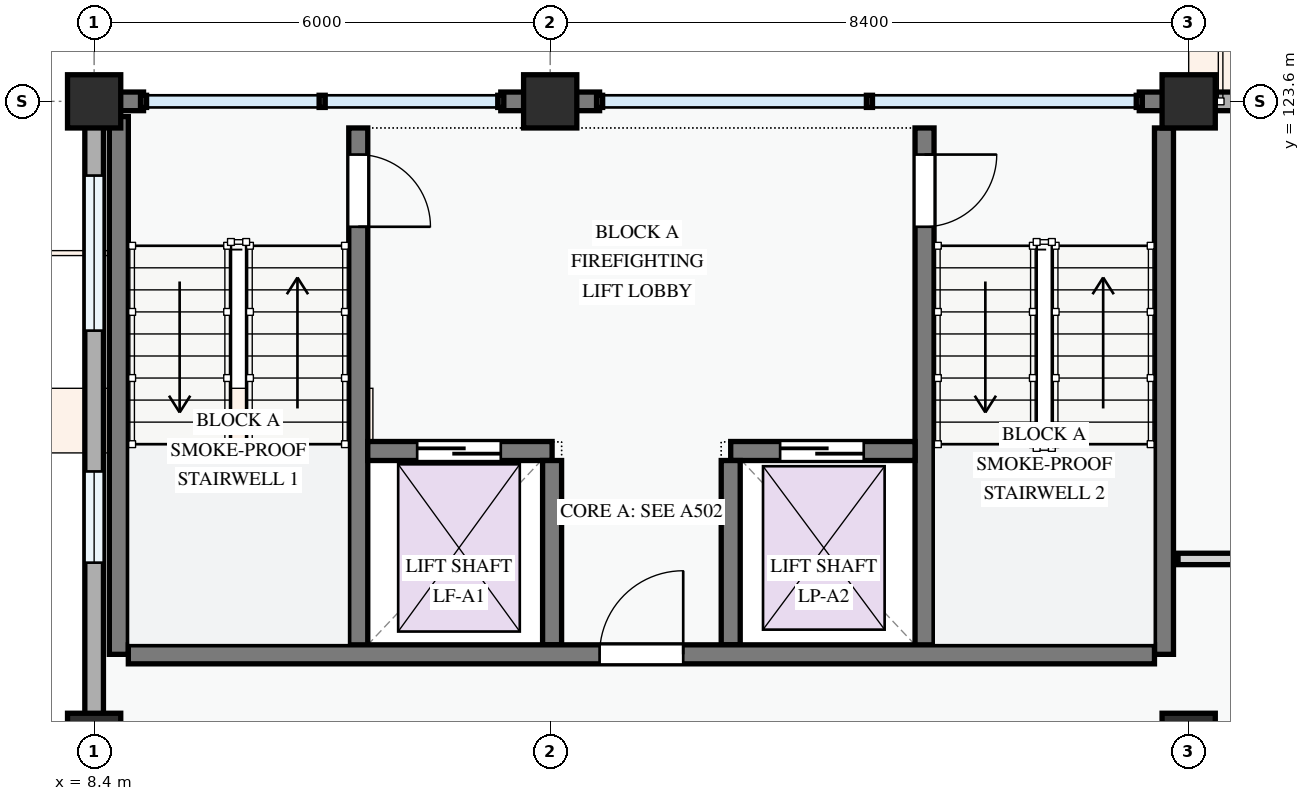
"""IFC4 building model, lengths in metres.
Left out: names, types, materials, properties, quantities, classifications, styles, units other than length and angle.
Written with IfcOpenShell. Run it as: python <this file> out.ifc"""

import sys

from ifc_helpers import new_model, si_unit, direction, frame, frame_2d, origin, origin_2d, place, context, subcontext, project, spatial, rectangle, extrude, element, fill, save


model = new_model("IFC4")
c1 = context("Model", 3, precision=1e-05, world=origin(), true_north=direction((0.0, 1.0)))
c2 = subcontext(c1, "Body", "Model", "MODEL_VIEW")
j1 = project(units=[si_unit("LENGTHUNIT", "METRE"), si_unit("PLANEANGLEUNIT", "RADIAN")], contexts=[c1])
p1 = place(None, origin())
s1 = spatial("IfcSite", under=j1, at=p1, CompositionType="ELEMENT")
p2 = place(p1, origin())
s2 = spatial("IfcBuilding", under=s1, at=p2, CompositionType="ELEMENT")
p3 = place(p2, frame((0.0, 0.0, 8.1)))
s3 = spatial("IfcBuildingStorey", under=s2, at=p3, CompositionType="ELEMENT", Elevation=8.1)
for number, where, z_axis, x_axis in (
    (1, (8.4, 115.2, 0.0), (0.0, 0.0, 1.0), (1.0, 0.0, 0.0)),
    (2, (8.4, 123.6, 0.0), (0.0, 0.0, 1.0), (1.0, 0.0, 0.0)),
    (3, (14.4, 123.6, 0.0), (0.0, 0.0, 1.0), (1.0, 0.0, 0.0)),
    (4, (22.8, 115.2, 0.0), (0.0, 0.0, 1.0), (1.0, 0.0, 0.0)),
    (5, (22.8, 123.6, 0.0), (0.0, 0.0, 1.0), (1.0, 0.0, 0.0)),
):
    element("IfcColumn", number, at=place(p3, frame(where, z_axis=z_axis, x_axis=x_axis)), inside=s3, PredefinedType="COLUMN", context=c2, shape_type="SweptSolid", body=[
        extrude(rectangle(XDim=0.7, YDim=0.7, at=origin_2d()), origin(), (0.0, 0.0, 1.0), 3.3),
    ])
p4 = place(p3, frame((28.8, 123.6, 0.0), z_axis=(0.0, 0.0, 1.0), x_axis=(-1.0, 0.0, 0.0)))
e6 = element("IfcWall", 6, at=p4, inside=s3, PredefinedType="STANDARD", context=c2, shape_type="SweptSolid", body=[
    extrude(rectangle(XDim=6.0, YDim=0.245, at=frame_2d((3.0, 0.0))), origin(), (0.0, 0.0, 1.0), 2.445),
])
p5 = place(p4, frame((0.62, 0.0, 0.0)))
e7 = element("IfcOpeningElement", 7, at=p5, cuts=e6, PredefinedType="OPENING", context=c2, shape_type="SweptSolid", body=[
    extrude(rectangle(XDim=1.6, YDim=2.2, at=frame_2d((0.8, 1.1))), frame((0.0, 0.133, 0.0), z_axis=(0.0, -1.0, 0.0), x_axis=(1.0, 0.0, 0.0)), (0.0, 0.0, 1.0), 0.265),
])
p6 = place(p4, frame((3.35, 0.0, 0.78)))
e8 = element("IfcOpeningElement", 8, at=p6, cuts=e6, PredefinedType="OPENING", context=c2, shape_type="SweptSolid", body=[
    extrude(rectangle(XDim=1.38, YDim=1.48, at=frame_2d((0.69, 0.74))), frame((0.0, 0.133, 0.0), z_axis=(0.0, -1.0, 0.0), x_axis=(1.0, 0.0, 0.0)), (0.0, 0.0, 1.0), 0.265),
])
for number, where, z_axis, x_axis in (
    (9, (22.8, 123.6, 0.0), (0.0, 0.0, 1.0), (-1.0, 0.0, 0.0)),
    (10, (15.05, 123.6, 0.0), (0.0, 0.0, 1.0), (-1.0, 0.0, 0.0)),
):
    element("IfcWall", number, at=place(p3, frame(where, z_axis=z_axis, x_axis=x_axis)), inside=s3, PredefinedType="STANDARD", context=c2, shape_type="SweptSolid", body=[
        extrude(rectangle(XDim=0.65, YDim=0.245, at=frame_2d((0.325, 0.0))), origin(), (0.0, 0.0, 1.0), 3.04),
    ])
p7 = place(p3, frame((14.4, 123.6, 0.0), z_axis=(0.0, 0.0, 1.0), x_axis=(-1.0, 0.0, 0.0)))
e11 = element("IfcWall", 11, at=p7, inside=s3, PredefinedType="STANDARD", context=c2, shape_type="SweptSolid", body=[
    extrude(rectangle(XDim=0.65, YDim=0.245, at=frame_2d((0.325, 0.0))), origin(), (0.0, 0.0, 1.0), 3.04),
])
p8 = place(p3, frame((9.05, 123.6, 0.0), z_axis=(0.0, 0.0, 1.0), x_axis=(-1.0, 0.0, 0.0)))
e12 = element("IfcWall", 12, at=p8, inside=s3, PredefinedType="STANDARD", context=c2, shape_type="SweptSolid", body=[
    extrude(rectangle(XDim=0.526, YDim=0.245, at=frame_2d((0.263, 0.0))), origin(), (0.0, 0.0, 1.0), 3.04),
])
p9 = place(p3, frame((8.4, 123.6, 0.0), z_axis=(0.0, 0.0, 1.0), x_axis=(0.0, -1.0, 0.0)))
e13 = element("IfcWall", 13, at=p9, inside=s3, PredefinedType="STANDARD", context=c2, shape_type="SweptSolid", body=[
    extrude(rectangle(XDim=8.4, YDim=0.245, at=frame_2d((4.2, 0.0))), origin(), (0.0, 0.0, 1.0), 2.345),
])
p10 = place(p9, frame((0.976, 0.0, 0.78)))
e14 = element("IfcOpeningElement", 14, at=p10, cuts=e13, PredefinedType="OPENING", context=c2, shape_type="SweptSolid", body=[
    extrude(rectangle(XDim=2.04, YDim=1.46, at=frame_2d((1.02, 0.73))), frame((0.0, 0.133, 0.0), z_axis=(0.0, -1.0, 0.0), x_axis=(1.0, 0.0, 0.0)), (0.0, 0.0, 1.0), 0.265),
])
p11 = place(p9, frame((4.869, 0.0, 0.78)))
e15 = element("IfcOpeningElement", 15, at=p11, cuts=e13, PredefinedType="OPENING", context=c2, shape_type="SweptSolid", body=[
    extrude(rectangle(XDim=1.2, YDim=1.35, at=frame_2d((0.6, 0.675))), frame((0.0, 0.133, 0.0), z_axis=(0.0, -1.0, 0.0), x_axis=(1.0, 0.0, 0.0)), (0.0, 0.0, 1.0), 0.265),
])
p12 = place(p3, frame((11.875, 123.25, 0.0), z_axis=(0.0, 0.0, 1.0), x_axis=(0.0, -1.0, 0.0)))
e16 = element("IfcWall", 16, at=p12, inside=s3, PredefinedType="SHEAR", context=c2, shape_type="SweptSolid", body=[
    extrude(rectangle(XDim=6.925, YDim=0.25, at=frame_2d((3.462, 0.0))), origin(), (0.0, 0.0, 1.0), 3.0),
])
p13 = place(p12, frame((0.35, 0.0, 0.0)))
e17 = element("IfcOpeningElement", 17, at=p13, cuts=e16, PredefinedType="OPENING", context=c2, shape_type="SweptSolid", body=[
    extrude(rectangle(XDim=0.95, YDim=2.1, at=frame_2d((0.475, 1.05))), frame((0.0, 0.135, 0.0), z_axis=(0.0, -1.0, 0.0), x_axis=(1.0, 0.0, 0.0)), (0.0, 0.0, 1.0), 0.27),
])
p14 = place(p3, frame((8.725, 123.4, 0.0), z_axis=(0.0, 0.0, 1.0), x_axis=(0.0, -1.0, 0.0)))
e18 = element("IfcWall", 18, at=p14, inside=s3, PredefinedType="SHEAR", context=c2, shape_type="SweptSolid", body=[
    extrude(rectangle(XDim=7.075, YDim=0.25, at=frame_2d((3.538, 0.0))), origin(), (0.0, 0.0, 1.0), 3.0),
])
p15 = place(p3, frame((22.475, 123.25, 0.0), z_axis=(0.0, 0.0, 1.0), x_axis=(0.0, -1.0, 0.0)))
e19 = element("IfcWall", 19, at=p15, inside=s3, PredefinedType="SHEAR", context=c2, shape_type="SweptSolid", body=[
    extrude(rectangle(XDim=6.925, YDim=0.25, at=frame_2d((3.462, 0.0))), origin(), (0.0, 0.0, 1.0), 3.0),
])
p16 = place(p3, frame((19.325, 123.25, 0.0), z_axis=(0.0, 0.0, 1.0), x_axis=(0.0, -1.0, 0.0)))
e20 = element("IfcWall", 20, at=p16, inside=s3, PredefinedType="SHEAR", context=c2, shape_type="SweptSolid", body=[
    extrude(rectangle(XDim=6.925, YDim=0.25, at=frame_2d((3.462, 0.0))), origin(), (0.0, 0.0, 1.0), 3.0),
])
p17 = place(p16, frame((0.35, 0.0, 0.0)))
e21 = element("IfcOpeningElement", 21, at=p17, cuts=e20, PredefinedType="OPENING", context=c2, shape_type="SweptSolid", body=[
    extrude(rectangle(XDim=0.95, YDim=2.1, at=frame_2d((0.475, 1.05))), frame((0.0, 0.135, 0.0), z_axis=(0.0, -1.0, 0.0), x_axis=(1.0, 0.0, 0.0)), (0.0, 0.0, 1.0), 0.27),
])
p18 = place(p3, frame((12.0, 119.0, 0.0), z_axis=(0.0, 0.0, 1.0), x_axis=(1.0, 0.0, 0.0)))
e22 = element("IfcWall", 22, at=p18, inside=s3, PredefinedType="SHEAR", context=c2, shape_type="SweptSolid", body=[
    extrude(rectangle(XDim=2.425, YDim=0.25, at=frame_2d((1.212, 0.0))), origin(), (0.0, 0.0, 1.0), 3.0),
])
p19 = place(p18, frame((0.65, 0.0, 0.0)))
e23 = element("IfcOpeningElement", 23, at=p19, cuts=e22, PredefinedType="OPENING", context=c2, shape_type="SweptSolid", body=[
    extrude(rectangle(XDim=1.1, YDim=2.15, at=frame_2d((0.55, 1.075))), frame((0.0, 0.135, 0.0), z_axis=(0.0, -1.0, 0.0), x_axis=(1.0, 0.0, 0.0)), (0.0, 0.0, 1.0), 0.27),
])
p20 = place(p3, frame((16.775, 119.0, 0.0), z_axis=(0.0, 0.0, 1.0), x_axis=(1.0, 0.0, 0.0)))
e24 = element("IfcWall", 24, at=p20, inside=s3, PredefinedType="SHEAR", context=c2, shape_type="SweptSolid", body=[
    extrude(rectangle(XDim=2.425, YDim=0.25, at=frame_2d((1.212, 0.0))), origin(), (0.0, 0.0, 1.0), 3.0),
])
p21 = place(p20, frame((0.65, 0.0, 0.0)))
e25 = element("IfcOpeningElement", 25, at=p21, cuts=e24, PredefinedType="OPENING", context=c2, shape_type="SweptSolid", body=[
    extrude(rectangle(XDim=1.1, YDim=2.15, at=frame_2d((0.55, 1.075))), frame((0.0, 0.135, 0.0), z_axis=(0.0, -1.0, 0.0), x_axis=(1.0, 0.0, 0.0)), (0.0, 0.0, 1.0), 0.27),
])
for number, where, z_axis, x_axis in (
    (26, (14.425, 118.875, 0.0), (0.0, 0.0, 1.0), (0.0, -1.0, 0.0)),
    (27, (16.775, 118.875, 0.0), (0.0, 0.0, 1.0), (0.0, -1.0, 0.0)),
):
    element("IfcWall", number, at=place(p3, frame(where, z_axis=z_axis, x_axis=x_axis)), inside=s3, PredefinedType="SHEAR", context=c2, shape_type="SweptSolid", body=[
        extrude(rectangle(XDim=2.425, YDim=0.25, at=frame_2d((1.212, 0.0))), origin(), (0.0, 0.0, 1.0), 3.0),
    ])
p22 = place(p3, frame((8.85, 116.325, 0.0), z_axis=(0.0, 0.0, 1.0), x_axis=(1.0, 0.0, 0.0)))
e28 = element("IfcWall", 28, at=p22, inside=s3, PredefinedType="SHEAR", context=c2, shape_type="SweptSolid", body=[
    extrude(rectangle(XDim=13.5, YDim=0.25, at=frame_2d((6.75, 0.0))), origin(), (0.0, 0.0, 1.0), 3.0),
])
p23 = place(p22, frame((6.2, 0.0, 0.0)))
e29 = element("IfcOpeningElement", 29, at=p23, cuts=e28, PredefinedType="OPENING", context=c2, shape_type="SweptSolid", body=[
    extrude(rectangle(XDim=1.1, YDim=2.15, at=frame_2d((0.55, 1.075))), frame((0.0, 0.135, 0.0), z_axis=(0.0, -1.0, 0.0), x_axis=(1.0, 0.0, 0.0)), (0.0, 0.0, 1.0), 0.27),
])
p24 = place(p3, frame((22.66, 117.58, 0.0), z_axis=(0.0, 0.0, 1.0), x_axis=(1.0, 0.0, 0.0)))
e30 = element("IfcWall", 30, at=p24, inside=s3, PredefinedType="PARTITIONING", context=c2, shape_type="SweptSolid", body=[
    extrude(rectangle(XDim=34.816, YDim=0.15, at=frame_2d((17.408, 0.0))), origin(), (0.0, 0.0, 1.0), 3.0),
])
p25 = place(p24, frame((2.74, 0.0, 0.0)))
e31 = element("IfcOpeningElement", 31, at=p25, cuts=e30, PredefinedType="OPENING", context=c2, shape_type="SweptSolid", body=[
    extrude(rectangle(XDim=0.92, YDim=2.1, at=frame_2d((0.46, 1.05))), frame((0.0, 0.085, 0.0), z_axis=(0.0, -1.0, 0.0), x_axis=(1.0, 0.0, 0.0)), (0.0, 0.0, 1.0), 0.17),
])
p26 = place(p24, frame((17.085, 0.0, 0.0)))
e32 = element("IfcOpeningElement", 32, at=p26, cuts=e30, PredefinedType="OPENING", context=c2, shape_type="SweptSolid", body=[
    extrude(rectangle(XDim=0.96, YDim=2.12, at=frame_2d((0.48, 1.06))), frame((0.0, 0.085, 0.0), z_axis=(0.0, -1.0, 0.0), x_axis=(1.0, 0.0, 0.0)), (0.0, 0.0, 1.0), 0.17),
])
p27 = place(p24, frame((24.77, 0.0, 0.0)))
e33 = element("IfcOpeningElement", 33, at=p27, cuts=e30, PredefinedType="OPENING", context=c2, shape_type="SweptSolid", body=[
    extrude(rectangle(XDim=0.92, YDim=2.1, at=frame_2d((0.46, 1.05))), frame((0.0, 0.085, 0.0), z_axis=(0.0, -1.0, 0.0), x_axis=(1.0, 0.0, 0.0)), (0.0, 0.0, 1.0), 0.17),
])
p28 = place(p10, origin())
e34 = element("IfcWindow", 34, at=p28, inside=s3, PartitioningType="DOUBLE_PANEL_VERTICAL", PredefinedType="WINDOW", context=c2, shape_type="SweptSolid", body=[
    extrude(rectangle(XDim=2.04, YDim=1.46, at=frame_2d((1.02, 0.73))), frame((0.0, 0.03, 0.0), z_axis=(0.0, -1.0, 0.0), x_axis=(1.0, 0.0, 0.0)), (0.0, 0.0, 1.0), 0.06),
])
fill(e14, e34)
p29 = place(p11, origin())
e35 = element("IfcWindow", 35, at=p29, inside=s3, PartitioningType="SINGLE_PANEL", PredefinedType="WINDOW", context=c2, shape_type="SweptSolid", body=[
    extrude(rectangle(XDim=1.2, YDim=1.35, at=frame_2d((0.6, 0.675))), frame((0.0, 0.03, 0.0), z_axis=(0.0, -1.0, 0.0), x_axis=(1.0, 0.0, 0.0)), (0.0, 0.0, 1.0), 0.06),
])
fill(e15, e35)
p30 = place(p13, origin())
e36 = element("IfcDoor", 36, at=p30, inside=s3, OperationType="SINGLE_SWING_RIGHT", PredefinedType="DOOR", context=c2, shape_type="SweptSolid", body=[
    extrude(rectangle(XDim=0.95, YDim=2.1, at=frame_2d((0.475, 1.05))), frame((0.0, 0.025, 0.0), z_axis=(0.0, -1.0, 0.0), x_axis=(1.0, 0.0, 0.0)), (0.0, 0.0, 1.0), 0.05),
])
fill(e17, e36)
p31 = place(p17, origin())
e37 = element("IfcDoor", 37, at=p31, inside=s3, OperationType="SINGLE_SWING_LEFT", PredefinedType="DOOR", context=c2, shape_type="SweptSolid", body=[
    extrude(rectangle(XDim=0.95, YDim=2.1, at=frame_2d((0.475, 1.05))), frame((0.0, 0.025, 0.0), z_axis=(0.0, -1.0, 0.0), x_axis=(1.0, 0.0, 0.0)), (0.0, 0.0, 1.0), 0.05),
])
fill(e21, e37)
p32 = place(p19, origin())
e38 = element("IfcDoor", 38, at=p32, inside=s3, OperationType="SLIDING_TO_LEFT", PredefinedType="DOOR", context=c2, shape_type="SweptSolid", body=[
    extrude(rectangle(XDim=1.1, YDim=2.15, at=frame_2d((0.55, 1.075))), frame((0.0, 0.025, 0.0), z_axis=(0.0, -1.0, 0.0), x_axis=(1.0, 0.0, 0.0)), (0.0, 0.0, 1.0), 0.05),
])
fill(e23, e38)
p33 = place(p21, origin())
e39 = element("IfcDoor", 39, at=p33, inside=s3, OperationType="SLIDING_TO_LEFT", PredefinedType="DOOR", context=c2, shape_type="SweptSolid", body=[
    extrude(rectangle(XDim=1.1, YDim=2.15, at=frame_2d((0.55, 1.075))), frame((0.0, 0.025, 0.0), z_axis=(0.0, -1.0, 0.0), x_axis=(1.0, 0.0, 0.0)), (0.0, 0.0, 1.0), 0.05),
])
fill(e25, e39)
p34 = place(p23, origin())
e40 = element("IfcDoor", 40, at=p34, inside=s3, OperationType="SINGLE_SWING_RIGHT", PredefinedType="DOOR", context=c2, shape_type="SweptSolid", body=[
    extrude(rectangle(XDim=1.1, YDim=2.15, at=frame_2d((0.55, 1.075))), frame((0.0, 0.025, 0.0), z_axis=(0.0, -1.0, 0.0), x_axis=(1.0, 0.0, 0.0)), (0.0, 0.0, 1.0), 0.05),
])
fill(e29, e40)
save(model, sys.argv[1])
